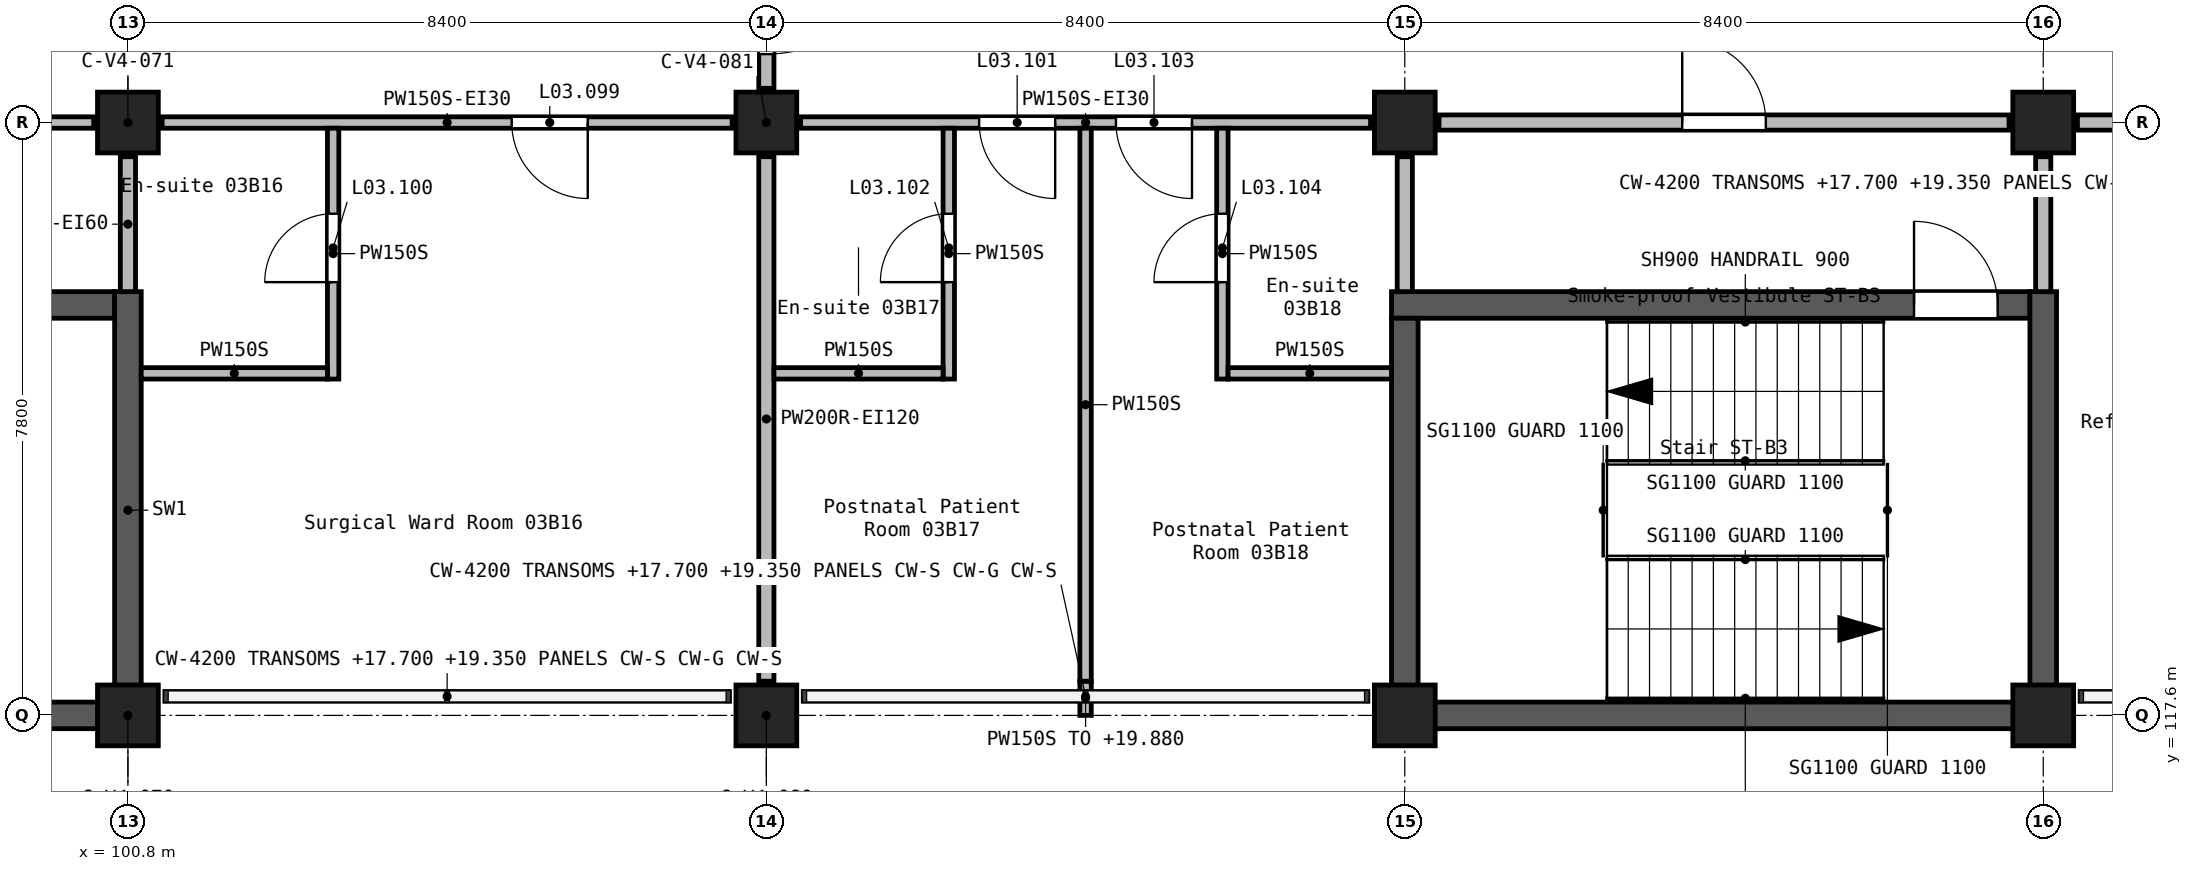
"""IFC4 building model, lengths in metres.
Left out: names, types, materials, properties, quantities, classifications, styles, units other than length and angle.
Written with IfcOpenShell. Run it as: python <this file> out.ifc"""

import sys

from ifc_helpers import new_model, si_unit, direction, frame, frame_2d, origin, origin_2d, place, context, subcontext, project, spatial, rectangle, extrude, element, fill, save


model = new_model("IFC4")
c1 = context("Model", 3, precision=1e-05, world=origin(), true_north=direction((0.0, 1.0)))
c2 = subcontext(c1, "Body", "Model", "MODEL_VIEW")
j1 = project(units=[si_unit("LENGTHUNIT", "METRE"), si_unit("PLANEANGLEUNIT", "RADIAN")], contexts=[c1])
p1 = place(None, origin())
s1 = spatial("IfcSite", under=j1, at=p1, CompositionType="ELEMENT")
p2 = place(p1, origin())
s2 = spatial("IfcBuilding", under=s1, at=p2, CompositionType="ELEMENT")
p3 = place(p2, frame((0.0, 0.0, 16.8)))
s3 = spatial("IfcBuildingStorey", under=s2, at=p3, CompositionType="ELEMENT", Elevation=16.8)
for number, where, z_axis, x_axis in (
    (1, (100.8, 117.6, 0.0), (0.0, 0.0, 1.0), (1.0, 0.0, 0.0)),
    (2, (100.8, 125.4, 0.0), (0.0, 0.0, 1.0), (1.0, 0.0, 0.0)),
    (3, (109.2, 117.6, 0.0), (0.0, 0.0, 1.0), (1.0, 0.0, 0.0)),
    (4, (109.2, 125.4, 0.0), (0.0, 0.0, 1.0), (1.0, 0.0, 0.0)),
    (5, (117.6, 117.6, 0.0), (0.0, 0.0, 1.0), (1.0, 0.0, 0.0)),
    (6, (117.6, 125.4, 0.0), (0.0, 0.0, 1.0), (1.0, 0.0, 0.0)),
    (7, (126.0, 117.6, 0.0), (0.0, 0.0, 1.0), (1.0, 0.0, 0.0)),
    (8, (126.0, 125.4, 0.0), (0.0, 0.0, 1.0), (1.0, 0.0, 0.0)),
):
    element("IfcColumn", number, at=place(p3, frame(where, z_axis=z_axis, x_axis=x_axis)), inside=s3, PredefinedType="COLUMN", context=c2, shape_type="SweptSolid", body=[
        extrude(rectangle(XDim=0.8, YDim=0.8, at=origin_2d()), origin(), (0.0, 0.0, 1.0), 4.2),
    ])
p4 = place(p3, frame((117.425, 123.0, 0.0), z_axis=(0.0, 0.0, 1.0), x_axis=(1.0, 0.0, 0.0)))
e9 = element("IfcWall", 9, at=p4, inside=s3, PredefinedType="SHEAR", context=c2, shape_type="SweptSolid", body=[
    extrude(rectangle(XDim=8.4, YDim=0.35, at=frame_2d((4.2, 0.0))), origin(), (0.0, 0.0, 1.0), 4.2),
])
p5 = place(p4, frame((6.875, 0.0, 0.0)))
e10 = element("IfcOpeningElement", 10, at=p5, cuts=e9, PredefinedType="OPENING", context=c2, shape_type="SweptSolid", body=[
    extrude(rectangle(XDim=1.1, YDim=2.1, at=frame_2d((0.55, 1.05))), frame((0.0, 0.185, 0.0), z_axis=(0.0, -1.0, 0.0), x_axis=(1.0, 0.0, 0.0)), (0.0, 0.0, 1.0), 0.37),
])
p6 = place(p3, frame((117.6, 117.425, 0.0), z_axis=(0.0, 0.0, 1.0), x_axis=(0.0, 1.0, 0.0)))
e11 = element("IfcWall", 11, at=p6, inside=s3, PredefinedType="SHEAR", context=c2, shape_type="SweptSolid", body=[
    extrude(rectangle(XDim=5.4, YDim=0.35, at=frame_2d((2.7, 0.0))), origin(), (0.0, 0.0, 1.0), 4.2),
])
p7 = place(p3, frame((117.775, 117.6, 0.0), z_axis=(0.0, 0.0, 1.0), x_axis=(1.0, 0.0, 0.0)))
e12 = element("IfcWall", 12, at=p7, inside=s3, PredefinedType="SHEAR", context=c2, shape_type="SweptSolid", body=[
    extrude(rectangle(XDim=8.05, YDim=0.35, at=frame_2d((4.025, 0.0))), origin(), (0.0, 0.0, 1.0), 4.2),
])
p8 = place(p3, frame((126.0, 117.425, 0.0), z_axis=(0.0, 0.0, 1.0), x_axis=(0.0, 1.0, 0.0)))
e13 = element("IfcWall", 13, at=p8, inside=s3, PredefinedType="SHEAR", context=c2, shape_type="SweptSolid", body=[
    extrude(rectangle(XDim=5.75, YDim=0.35, at=frame_2d((2.875, 0.0))), origin(), (0.0, 0.0, 1.0), 4.2),
])
for number, where, z_axis, x_axis in (
    (14, (98.7, 117.6, 0.0), (0.0, 0.0, 1.0), (1.0, 0.0, 0.0)),
    (15, (98.7, 123.0, 0.0), (0.0, 0.0, 1.0), (1.0, 0.0, 0.0)),
):
    element("IfcWall", number, at=place(p3, frame(where, z_axis=z_axis, x_axis=x_axis)), inside=s3, PredefinedType="SHEAR", context=c2, shape_type="SweptSolid", body=[
        extrude(rectangle(XDim=1.925, YDim=0.35, at=frame_2d((0.962, 0.0))), origin(), (0.0, 0.0, 1.0), 3.9),
    ])
p9 = place(p3, frame((100.8, 117.425, 0.0), z_axis=(0.0, 0.0, 1.0), x_axis=(0.0, 1.0, 0.0)))
e16 = element("IfcWall", 16, at=p9, inside=s3, PredefinedType="SHEAR", context=c2, shape_type="SweptSolid", body=[
    extrude(rectangle(XDim=5.75, YDim=0.35, at=frame_2d((2.875, 0.0))), origin(), (0.0, 0.0, 1.0), 3.9),
])
p10 = place(p3, frame((109.2, 128.55, 0.0), z_axis=(0.0, 0.0, 1.0), x_axis=(0.0, -1.0, 0.0)))
e17 = element("IfcWall", 17, at=p10, inside=s3, PredefinedType="SOLIDWALL", context=c2, shape_type="SweptSolid", body=[
    extrude(rectangle(XDim=2.7, YDim=0.2, at=frame_2d((1.35, 0.0))), origin(), (0.0, 0.0, 1.0), 3.9),
])
p11 = place(p10, frame((0.45, 0.0, 0.0)))
e18 = element("IfcOpeningElement", 18, at=p11, cuts=e17, PredefinedType="OPENING", context=c2, shape_type="SweptSolid", body=[
    extrude(rectangle(XDim=1.8, YDim=2.1, at=frame_2d((0.9, 1.05))), frame((0.0, 0.11, 0.0), z_axis=(0.0, -1.0, 0.0), x_axis=(1.0, 0.0, 0.0)), (0.0, 0.0, 1.0), 0.22),
])
p12 = place(p3, frame((109.2, 124.95, 0.0), z_axis=(0.0, 0.0, 1.0), x_axis=(0.0, -1.0, 0.0)))
e19 = element("IfcWall", 19, at=p12, inside=s3, PredefinedType="SOLIDWALL", context=c2, shape_type="SweptSolid", body=[
    extrude(rectangle(XDim=6.9, YDim=0.2, at=frame_2d((3.45, 0.0))), origin(), (0.0, 0.0, 1.0), 3.9),
])
p13 = place(p3, frame((118.05, 125.4, 0.0), z_axis=(0.0, 0.0, 1.0), x_axis=(1.0, 0.0, 0.0)))
e20 = element("IfcWall", 20, at=p13, inside=s3, PredefinedType="SOLIDWALL", context=c2, shape_type="SweptSolid", body=[
    extrude(rectangle(XDim=7.5, YDim=0.2, at=frame_2d((3.75, 0.0))), origin(), (0.0, 0.0, 1.0), 3.9),
])
p14 = place(p13, frame((3.2, 0.0, 0.0)))
e21 = element("IfcOpeningElement", 21, at=p14, cuts=e20, PredefinedType="OPENING", context=c2, shape_type="SweptSolid", body=[
    extrude(rectangle(XDim=1.1, YDim=2.1, at=frame_2d((0.55, 1.05))), frame((0.0, 0.11, 0.0), z_axis=(0.0, -1.0, 0.0), x_axis=(1.0, 0.0, 0.0)), (0.0, 0.0, 1.0), 0.22),
])
p15 = place(p3, frame((126.45, 125.4, 0.0), z_axis=(0.0, 0.0, 1.0), x_axis=(1.0, 0.0, 0.0)))
e22 = element("IfcWall", 22, at=p15, inside=s3, PredefinedType="SOLIDWALL", context=c2, shape_type="SweptSolid", body=[
    extrude(rectangle(XDim=3.85, YDim=0.2, at=frame_2d((1.925, 0.0))), origin(), (0.0, 0.0, 1.0), 3.9),
])
p16 = place(p15, frame((1.15, 0.0, 0.0)))
e23 = element("IfcOpeningElement", 23, at=p16, cuts=e22, PredefinedType="OPENING", context=c2, shape_type="SweptSolid", body=[
    extrude(rectangle(XDim=1.0, YDim=2.1, at=frame_2d((0.5, 1.05))), frame((0.0, 0.11, 0.0), z_axis=(0.0, -1.0, 0.0), x_axis=(1.0, 0.0, 0.0)), (0.0, 0.0, 1.0), 0.22),
])
for number, where, z_axis, x_axis in (
    (24, (126.0, 123.175, 0.0), (0.0, 0.0, 1.0), (0.0, 1.0, 0.0)),
    (25, (100.8, 123.175, 0.0), (0.0, 0.0, 1.0), (0.0, 1.0, 0.0)),
    (26, (117.6, 123.175, 0.0), (0.0, 0.0, 1.0), (0.0, 1.0, 0.0)),
):
    element("IfcWall", number, at=place(p3, frame(where, z_axis=z_axis, x_axis=x_axis)), inside=s3, PredefinedType="SOLIDWALL", context=c2, shape_type="SweptSolid", body=[
        extrude(rectangle(XDim=1.775, YDim=0.2, at=frame_2d((0.887, 0.0))), origin(), (0.0, 0.0, 1.0), 3.9),
    ])
p17 = place(p3, frame((117.15, 125.4, 0.0), z_axis=(0.0, 0.0, 1.0), x_axis=(-1.0, 0.0, 0.0)))
e27 = element("IfcWall", 27, at=p17, inside=s3, PredefinedType="PARTITIONING", context=c2, shape_type="SweptSolid", body=[
    extrude(rectangle(XDim=7.5, YDim=0.15, at=frame_2d((3.75, 0.0))), origin(), (0.0, 0.0, 1.0), 3.9),
])
p18 = place(p17, frame((4.15, 0.0, 0.0)))
e28 = element("IfcOpeningElement", 28, at=p18, cuts=e27, PredefinedType="OPENING", context=c2, shape_type="SweptSolid", body=[
    extrude(rectangle(XDim=1.0, YDim=2.1, at=frame_2d((0.5, 1.05))), frame((0.0, 0.085, 0.0), z_axis=(0.0, -1.0, 0.0), x_axis=(1.0, 0.0, 0.0)), (0.0, 0.0, 1.0), 0.17),
])
p19 = place(p17, frame((2.35, 0.0, 0.0)))
e29 = element("IfcOpeningElement", 29, at=p19, cuts=e27, PredefinedType="OPENING", context=c2, shape_type="SweptSolid", body=[
    extrude(rectangle(XDim=1.0, YDim=2.1, at=frame_2d((0.5, 1.05))), frame((0.0, 0.085, 0.0), z_axis=(0.0, -1.0, 0.0), x_axis=(1.0, 0.0, 0.0)), (0.0, 0.0, 1.0), 0.17),
])
p20 = place(p3, frame((108.75, 125.4, 0.0), z_axis=(0.0, 0.0, 1.0), x_axis=(-1.0, 0.0, 0.0)))
e30 = element("IfcWall", 30, at=p20, inside=s3, PredefinedType="PARTITIONING", context=c2, shape_type="SweptSolid", body=[
    extrude(rectangle(XDim=7.5, YDim=0.15, at=frame_2d((3.75, 0.0))), origin(), (0.0, 0.0, 1.0), 3.9),
])
p21 = place(p20, frame((1.9, 0.0, 0.0)))
e31 = element("IfcOpeningElement", 31, at=p21, cuts=e30, PredefinedType="OPENING", context=c2, shape_type="SweptSolid", body=[
    extrude(rectangle(XDim=1.0, YDim=2.1, at=frame_2d((0.5, 1.05))), frame((0.0, 0.085, 0.0), z_axis=(0.0, -1.0, 0.0), x_axis=(1.0, 0.0, 0.0)), (0.0, 0.0, 1.0), 0.17),
])
p22 = place(p3, frame((92.85, 125.4, 0.0), z_axis=(0.0, 0.0, 1.0), x_axis=(1.0, 0.0, 0.0)))
e32 = element("IfcWall", 32, at=p22, inside=s3, PredefinedType="PARTITIONING", context=c2, shape_type="SweptSolid", body=[
    extrude(rectangle(XDim=7.5, YDim=0.15, at=frame_2d((3.75, 0.0))), origin(), (0.0, 0.0, 1.0), 3.9),
])
p23 = place(p22, frame((3.25, 0.0, 0.0)))
e33 = element("IfcOpeningElement", 33, at=p23, cuts=e32, PredefinedType="OPENING", context=c2, shape_type="SweptSolid", body=[
    extrude(rectangle(XDim=1.0, YDim=2.1, at=frame_2d((0.5, 1.05))), frame((0.0, 0.085, 0.0), z_axis=(0.0, -1.0, 0.0), x_axis=(1.0, 0.0, 0.0)), (0.0, 0.0, 1.0), 0.17),
])
p24 = place(p3, frame((113.4, 117.6, 0.0), z_axis=(0.0, 0.0, 1.0), x_axis=(0.0, 1.0, 0.0)))
e34 = element("IfcWall", 34, at=p24, inside=s3, PredefinedType="PARTITIONING", context=c2, shape_type="SweptSolid", body=[
    extrude(rectangle(XDim=0.45, YDim=0.15, at=frame_2d((0.225, 0.0))), origin(), (0.0, 0.0, 1.0), 3.08),
])
p25 = place(p3, frame((113.4, 118.05, 0.0), z_axis=(0.0, 0.0, 1.0), x_axis=(0.0, 1.0, 0.0)))
e35 = element("IfcWall", 35, at=p25, inside=s3, PredefinedType="PARTITIONING", context=c2, shape_type="SweptSolid", body=[
    extrude(rectangle(XDim=7.275, YDim=0.15, at=frame_2d((3.637, 0.0))), origin(), (0.0, 0.0, 1.0), 3.9),
])
p26 = place(p3, frame((103.5, 122.025, 0.0), z_axis=(0.0, 0.0, 1.0), x_axis=(0.0, 1.0, 0.0)))
e36 = element("IfcWall", 36, at=p26, inside=s3, PredefinedType="PARTITIONING", context=c2, shape_type="SweptSolid", body=[
    extrude(rectangle(XDim=3.3, YDim=0.15, at=frame_2d((1.65, 0.0))), origin(), (0.0, 0.0, 1.0), 3.9),
])
p27 = place(p26, frame((1.275, 0.0, 0.0)))
e37 = element("IfcOpeningElement", 37, at=p27, cuts=e36, PredefinedType="OPENING", context=c2, shape_type="SweptSolid", body=[
    extrude(rectangle(XDim=0.9, YDim=2.1, at=frame_2d((0.45, 1.05))), frame((0.0, 0.085, 0.0), z_axis=(0.0, -1.0, 0.0), x_axis=(1.0, 0.0, 0.0)), (0.0, 0.0, 1.0), 0.17),
])
p28 = place(p3, frame((111.6, 122.025, 0.0), z_axis=(0.0, 0.0, 1.0), x_axis=(0.0, 1.0, 0.0)))
e38 = element("IfcWall", 38, at=p28, inside=s3, PredefinedType="PARTITIONING", context=c2, shape_type="SweptSolid", body=[
    extrude(rectangle(XDim=3.3, YDim=0.15, at=frame_2d((1.65, 0.0))), origin(), (0.0, 0.0, 1.0), 3.9),
])
p29 = place(p28, frame((1.275, 0.0, 0.0)))
e39 = element("IfcOpeningElement", 39, at=p29, cuts=e38, PredefinedType="OPENING", context=c2, shape_type="SweptSolid", body=[
    extrude(rectangle(XDim=0.9, YDim=2.1, at=frame_2d((0.45, 1.05))), frame((0.0, 0.085, 0.0), z_axis=(0.0, -1.0, 0.0), x_axis=(1.0, 0.0, 0.0)), (0.0, 0.0, 1.0), 0.17),
])
p30 = place(p3, frame((115.2, 122.025, 0.0), z_axis=(0.0, 0.0, 1.0), x_axis=(0.0, 1.0, 0.0)))
e40 = element("IfcWall", 40, at=p30, inside=s3, PredefinedType="PARTITIONING", context=c2, shape_type="SweptSolid", body=[
    extrude(rectangle(XDim=3.3, YDim=0.15, at=frame_2d((1.65, 0.0))), origin(), (0.0, 0.0, 1.0), 3.9),
])
p31 = place(p30, frame((1.275, 0.0, 0.0)))
e41 = element("IfcOpeningElement", 41, at=p31, cuts=e40, PredefinedType="OPENING", context=c2, shape_type="SweptSolid", body=[
    extrude(rectangle(XDim=0.9, YDim=2.1, at=frame_2d((0.45, 1.05))), frame((0.0, 0.085, 0.0), z_axis=(0.0, -1.0, 0.0), x_axis=(1.0, 0.0, 0.0)), (0.0, 0.0, 1.0), 0.17),
])
p32 = place(p3, frame((100.975, 122.1, 0.0), z_axis=(0.0, 0.0, 1.0), x_axis=(1.0, 0.0, 0.0)))
e42 = element("IfcWall", 42, at=p32, inside=s3, PredefinedType="PARTITIONING", context=c2, shape_type="SweptSolid", body=[
    extrude(rectangle(XDim=2.45, YDim=0.15, at=frame_2d((1.225, 0.0))), origin(), (0.0, 0.0, 1.0), 3.9),
])
p33 = place(p3, frame((109.3, 122.1, 0.0), z_axis=(0.0, 0.0, 1.0), x_axis=(1.0, 0.0, 0.0)))
e43 = element("IfcWall", 43, at=p33, inside=s3, PredefinedType="PARTITIONING", context=c2, shape_type="SweptSolid", body=[
    extrude(rectangle(XDim=2.225, YDim=0.15, at=frame_2d((1.112, 0.0))), origin(), (0.0, 0.0, 1.0), 3.9),
])
p34 = place(p3, frame((115.275, 122.1, 0.0), z_axis=(0.0, 0.0, 1.0), x_axis=(1.0, 0.0, 0.0)))
e44 = element("IfcWall", 44, at=p34, inside=s3, PredefinedType="PARTITIONING", context=c2, shape_type="SweptSolid", body=[
    extrude(rectangle(XDim=2.15, YDim=0.15, at=frame_2d((1.075, 0.0))), origin(), (0.0, 0.0, 1.0), 3.9),
])
p35 = place(p11, origin())
e45 = element("IfcDoor", 45, at=p35, inside=s3, OperationType="DOUBLE_DOOR_SINGLE_SWING", PredefinedType="DOOR", context=c2, shape_type="SweptSolid", body=[
    extrude(rectangle(XDim=1.8, YDim=2.1, at=frame_2d((0.9, 1.05))), frame((0.0, 0.025, 0.0), z_axis=(0.0, -1.0, 0.0), x_axis=(1.0, 0.0, 0.0)), (0.0, 0.0, 1.0), 0.05),
])
fill(e18, e45)
p36 = place(p21, origin())
e46 = element("IfcDoor", 46, at=p36, inside=s3, OperationType="SINGLE_SWING_LEFT", PredefinedType="DOOR", context=c2, shape_type="SweptSolid", body=[
    extrude(rectangle(XDim=1.0, YDim=2.1, at=frame_2d((0.5, 1.05))), frame((0.0, 0.025, 0.0), z_axis=(0.0, -1.0, 0.0), x_axis=(1.0, 0.0, 0.0)), (0.0, 0.0, 1.0), 0.05),
])
fill(e31, e46)
p37 = place(p27, origin())
e47 = element("IfcDoor", 47, at=p37, inside=s3, OperationType="SINGLE_SWING_RIGHT", PredefinedType="DOOR", context=c2, shape_type="SweptSolid", body=[
    extrude(rectangle(XDim=0.9, YDim=2.1, at=frame_2d((0.45, 1.05))), frame((0.0, 0.025, 0.0), z_axis=(0.0, -1.0, 0.0), x_axis=(1.0, 0.0, 0.0)), (0.0, 0.0, 1.0), 0.05),
])
fill(e37, e47)
p38 = place(p18, origin())
e48 = element("IfcDoor", 48, at=p38, inside=s3, OperationType="SINGLE_SWING_RIGHT", PredefinedType="DOOR", context=c2, shape_type="SweptSolid", body=[
    extrude(rectangle(XDim=1.0, YDim=2.1, at=frame_2d((0.5, 1.05))), frame((0.0, 0.025, 0.0), z_axis=(0.0, -1.0, 0.0), x_axis=(1.0, 0.0, 0.0)), (0.0, 0.0, 1.0), 0.05),
])
fill(e28, e48)
p39 = place(p29, origin())
e49 = element("IfcDoor", 49, at=p39, inside=s3, OperationType="SINGLE_SWING_RIGHT", PredefinedType="DOOR", context=c2, shape_type="SweptSolid", body=[
    extrude(rectangle(XDim=0.9, YDim=2.1, at=frame_2d((0.45, 1.05))), frame((0.0, 0.025, 0.0), z_axis=(0.0, -1.0, 0.0), x_axis=(1.0, 0.0, 0.0)), (0.0, 0.0, 1.0), 0.05),
])
fill(e39, e49)
p40 = place(p19, origin())
e50 = element("IfcDoor", 50, at=p40, inside=s3, OperationType="SINGLE_SWING_LEFT", PredefinedType="DOOR", context=c2, shape_type="SweptSolid", body=[
    extrude(rectangle(XDim=1.0, YDim=2.1, at=frame_2d((0.5, 1.05))), frame((0.0, 0.025, 0.0), z_axis=(0.0, -1.0, 0.0), x_axis=(1.0, 0.0, 0.0)), (0.0, 0.0, 1.0), 0.05),
])
fill(e29, e50)
p41 = place(p31, frame((0.9, 0.0, 0.0), z_axis=(0.0, 0.0, 1.0), x_axis=(-1.0, 0.0, 0.0)))
e51 = element("IfcDoor", 51, at=p41, inside=s3, OperationType="SINGLE_SWING_LEFT", PredefinedType="DOOR", context=c2, shape_type="SweptSolid", body=[
    extrude(rectangle(XDim=0.9, YDim=2.1, at=frame_2d((0.45, 1.05))), frame((0.0, 0.025, 0.0), z_axis=(0.0, -1.0, 0.0), x_axis=(1.0, 0.0, 0.0)), (0.0, 0.0, 1.0), 0.05),
])
fill(e41, e51)
p42 = place(p5, frame((1.1, 0.0, 0.0), z_axis=(0.0, 0.0, 1.0), x_axis=(-1.0, 0.0, 0.0)))
e52 = element("IfcDoor", 52, at=p42, inside=s3, OperationType="SINGLE_SWING_LEFT", PredefinedType="DOOR", context=c2, shape_type="SweptSolid", body=[
    extrude(rectangle(XDim=1.1, YDim=2.1, at=frame_2d((0.55, 1.05))), frame((0.0, 0.025, 0.0), z_axis=(0.0, -1.0, 0.0), x_axis=(1.0, 0.0, 0.0)), (0.0, 0.0, 1.0), 0.05),
])
fill(e10, e52)
p43 = place(p14, frame((1.1, 0.0, 0.0), z_axis=(0.0, 0.0, 1.0), x_axis=(-1.0, 0.0, 0.0)))
e53 = element("IfcDoor", 53, at=p43, inside=s3, OperationType="SINGLE_SWING_LEFT", PredefinedType="DOOR", context=c2, shape_type="SweptSolid", body=[
    extrude(rectangle(XDim=1.1, YDim=2.1, at=frame_2d((0.55, 1.05))), frame((0.0, 0.025, 0.0), z_axis=(0.0, -1.0, 0.0), x_axis=(1.0, 0.0, 0.0)), (0.0, 0.0, 1.0), 0.05),
])
fill(e21, e53)
save(model, sys.argv[1])
